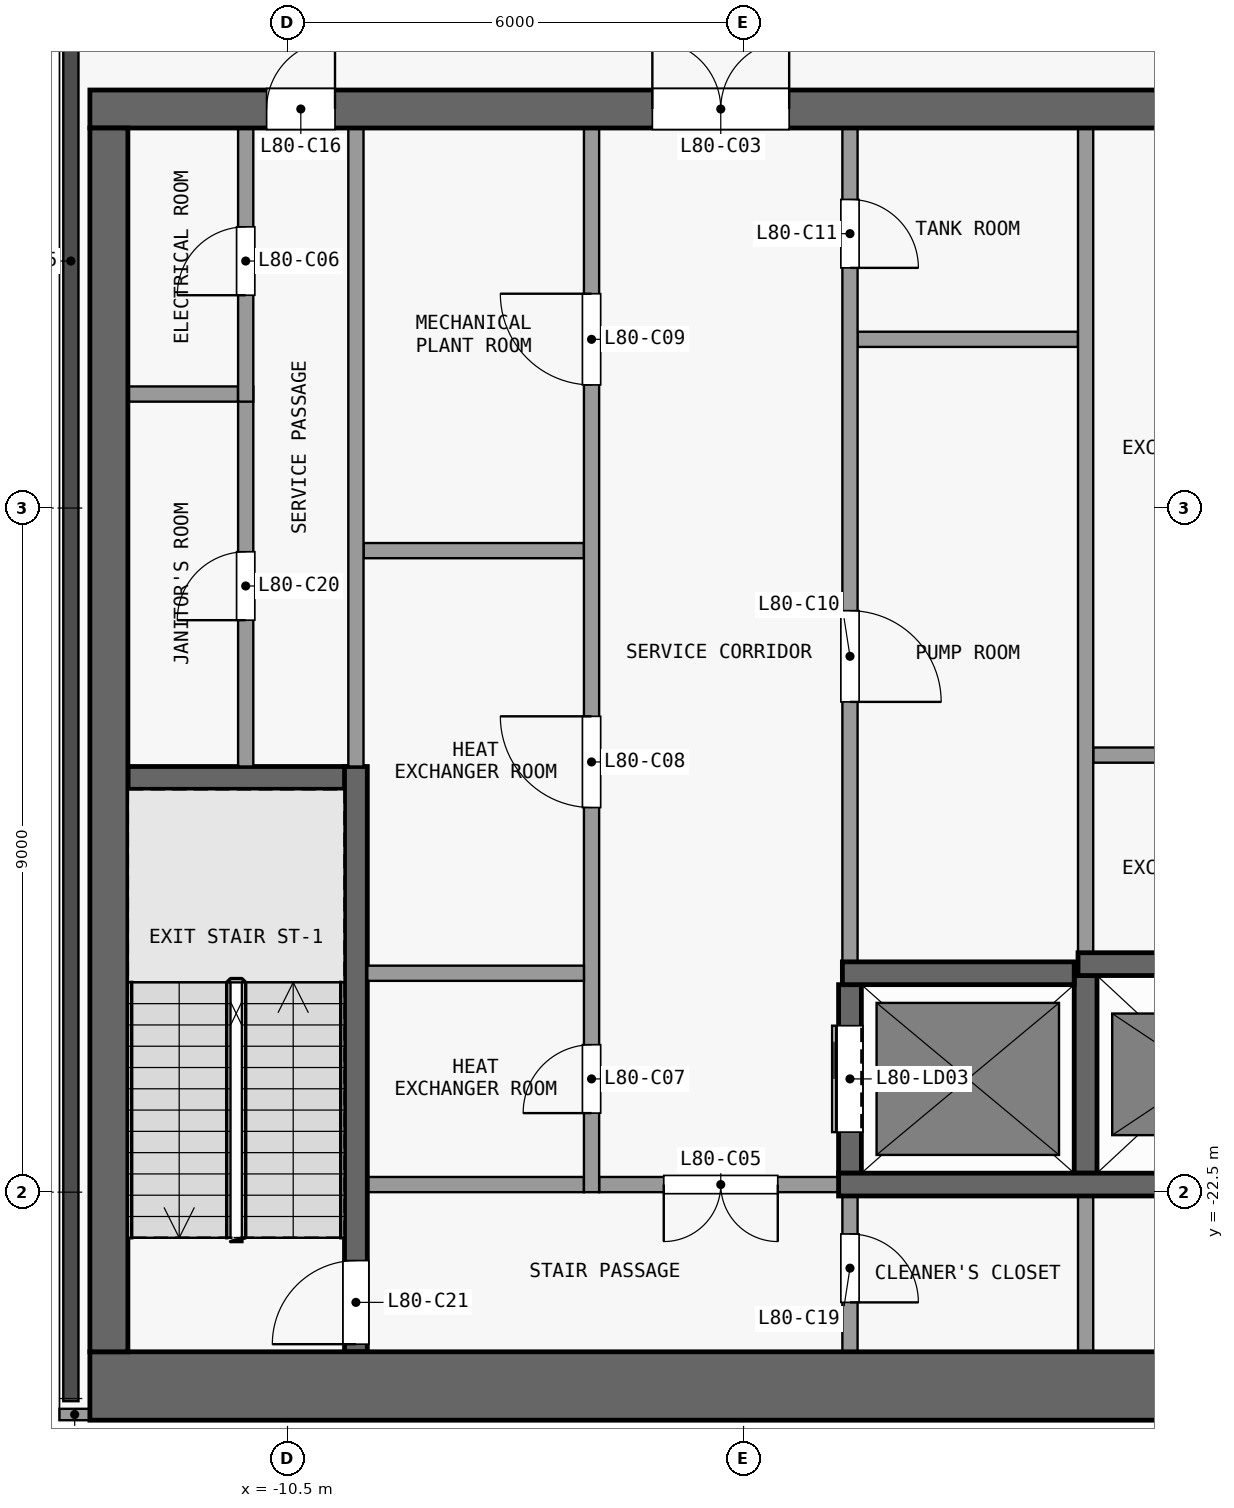
"""IFC4 building model, lengths in metres.
Left out: names, types, materials, properties, quantities, classifications, styles, units other than length and angle.
Written with IfcOpenShell. Run it as: python <this file> out.ifc"""

import sys

from ifc_helpers import new_model, si_unit, direction, frame, frame_2d, origin, place, context, subcontext, project, spatial, rectangle, extrude, element, fill, save


model = new_model("IFC4")
c1 = context("Model", 3, precision=1e-05, world=origin(), true_north=direction((0.0, 1.0)))
c2 = subcontext(c1, "Body", "Model", "MODEL_VIEW")
j1 = project(units=[si_unit("LENGTHUNIT", "METRE"), si_unit("PLANEANGLEUNIT", "RADIAN")], contexts=[c1])
p1 = place(None, origin())
s1 = spatial("IfcSite", under=j1, at=p1, CompositionType="ELEMENT")
p2 = place(p1, origin())
s2 = spatial("IfcBuilding", under=s1, at=p2, CompositionType="ELEMENT")
p3 = place(p2, frame((0.0, 0.0, 316.7)))
s3 = spatial("IfcBuildingStorey", under=s2, at=p3, CompositionType="ELEMENT", Elevation=316.7)
p4 = place(p3, frame((-13.1, -25.05, 0.0), z_axis=(0.0, 0.0, 1.0), x_axis=(1.0, 0.0, 0.0)))
e1 = element("IfcWall", 1, at=p4, inside=s3, PredefinedType="SHEAR", context=c2, shape_type="SweptSolid", body=[
    extrude(rectangle(XDim=26.2, YDim=0.9, at=frame_2d((13.1, 0.0))), origin(), (0.0, 0.0, 1.0), 4.2),
])
p5 = place(p3, frame((-13.1, -8.25, 0.0), z_axis=(0.0, 0.0, 1.0), x_axis=(1.0, 0.0, 0.0)))
e2 = element("IfcWall", 2, at=p5, inside=s3, PredefinedType="SHEAR", context=c2, shape_type="SweptSolid", body=[
    extrude(rectangle(XDim=26.2, YDim=0.5, at=frame_2d((13.1, 0.0))), origin(), (0.0, 0.0, 1.0), 4.2),
])
p6 = place(p5, frame((7.4, 0.0, 0.0)))
e3 = element("IfcOpeningElement", 3, at=p6, cuts=e2, PredefinedType="OPENING", context=c2, shape_type="SweptSolid", body=[
    extrude(rectangle(XDim=1.8, YDim=2.1, at=frame_2d((0.9, 1.05))), frame((0.0, 0.26, 0.0), z_axis=(0.0, -1.0, 0.0), x_axis=(1.0, 0.0, 0.0)), (0.0, 0.0, 1.0), 0.52),
])
p7 = place(p5, frame((17.0, 0.0, 0.0)))
e4 = element("IfcOpeningElement", 4, at=p7, cuts=e2, PredefinedType="OPENING", context=c2, shape_type="SweptSolid", body=[
    extrude(rectangle(XDim=1.8, YDim=2.1, at=frame_2d((0.9, 1.05))), frame((0.0, 0.26, 0.0), z_axis=(0.0, -1.0, 0.0), x_axis=(1.0, 0.0, 0.0)), (0.0, 0.0, 1.0), 0.52),
])
p8 = place(p5, frame((2.325, 0.0, 0.0)))
e5 = element("IfcOpeningElement", 5, at=p8, cuts=e2, PredefinedType="OPENING", context=c2, shape_type="SweptSolid", body=[
    extrude(rectangle(XDim=0.9, YDim=2.1, at=frame_2d((0.45, 1.05))), frame((0.0, 0.26, 0.0), z_axis=(0.0, -1.0, 0.0), x_axis=(1.0, 0.0, 0.0)), (0.0, 0.0, 1.0), 0.52),
])
p9 = place(p5, frame((23.675, 0.0, 0.0)))
e6 = element("IfcOpeningElement", 6, at=p9, cuts=e2, PredefinedType="OPENING", context=c2, shape_type="SweptSolid", body=[
    extrude(rectangle(XDim=1.2, YDim=2.1, at=frame_2d((0.6, 1.05))), frame((0.0, 0.26, 0.0), z_axis=(0.0, -1.0, 0.0), x_axis=(1.0, 0.0, 0.0)), (0.0, 0.0, 1.0), 0.52),
])
p10 = place(p3, frame((-12.85, -24.6, 0.0), z_axis=(0.0, 0.0, 1.0), x_axis=(0.0, 1.0, 0.0)))
e7 = element("IfcWall", 7, at=p10, inside=s3, PredefinedType="SHEAR", context=c2, shape_type="SweptSolid", body=[
    extrude(rectangle(XDim=16.1, YDim=0.5, at=frame_2d((8.05, 0.0))), origin(), (0.0, 0.0, 1.0), 4.2),
])
p11 = place(p3, frame((-9.45, -22.4, 0.0), z_axis=(0.0, 0.0, 1.0), x_axis=(1.0, 0.0, 0.0)))
e8 = element("IfcWall", 8, at=p11, inside=s3, PredefinedType="PARTITIONING", context=c2, shape_type="SweptSolid", body=[
    extrude(rectangle(XDim=2.85, YDim=0.2, at=frame_2d((1.425, 0.0))), origin(), (0.0, 0.0, 1.0), 4.2),
])
p12 = place(p3, frame((-3.25, -22.4, 0.0), z_axis=(0.0, 0.0, 1.0), x_axis=(-1.0, 0.0, 0.0)))
e9 = element("IfcWall", 9, at=p12, inside=s3, PredefinedType="PARTITIONING", context=c2, shape_type="SweptSolid", body=[
    extrude(rectangle(XDim=3.15, YDim=0.2, at=frame_2d((1.575, 0.0))), origin(), (0.0, 0.0, 1.0), 4.2),
])
p13 = place(p12, frame((0.8, 0.0, 0.0)))
e10 = element("IfcOpeningElement", 10, at=p13, cuts=e9, PredefinedType="OPENING", context=c2, shape_type="SweptSolid", body=[
    extrude(rectangle(XDim=1.5, YDim=2.1, at=frame_2d((0.75, 1.05))), frame((0.0, 0.11, 0.0), z_axis=(0.0, -1.0, 0.0), x_axis=(1.0, 0.0, 0.0)), (0.0, 0.0, 1.0), 0.22),
])
p14 = place(p3, frame((-3.25, -22.4, 0.0), z_axis=(0.0, 0.0, 1.0), x_axis=(1.0, 0.0, 0.0)))
e11 = element("IfcWall", 11, at=p14, inside=s3, PredefinedType="SHEAR", context=c2, shape_type="SweptSolid", body=[
    extrude(rectangle(XDim=6.5, YDim=0.3, at=frame_2d((3.25, 0.0))), origin(), (0.0, 0.0, 1.0), 4.2),
])
p15 = place(p3, frame((-9.45, -19.62, 0.0), z_axis=(0.0, 0.0, 1.0), x_axis=(1.0, 0.0, 0.0)))
e12 = element("IfcWall", 12, at=p15, inside=s3, PredefinedType="PARTITIONING", context=c2, shape_type="SweptSolid", body=[
    extrude(rectangle(XDim=2.85, YDim=0.2, at=frame_2d((1.425, 0.0))), origin(), (0.0, 0.0, 1.0), 4.2),
])
p16 = place(p3, frame((-3.2, -19.62, 0.0), z_axis=(0.0, 0.0, 1.0), x_axis=(1.0, 0.0, 0.0)))
e13 = element("IfcWall", 13, at=p16, inside=s3, PredefinedType="SHEAR", context=c2, shape_type="SweptSolid", body=[
    extrude(rectangle(XDim=3.05, YDim=0.3, at=frame_2d((1.525, 0.0))), origin(), (0.0, 0.0, 1.0), 4.2),
])
p17 = place(p3, frame((-0.1, -19.5, 0.0), z_axis=(0.0, 0.0, 1.0), x_axis=(1.0, 0.0, 0.0)))
e14 = element("IfcWall", 14, at=p17, inside=s3, PredefinedType="SHEAR", context=c2, shape_type="SweptSolid", body=[
    extrude(rectangle(XDim=3.3, YDim=0.3, at=frame_2d((1.65, 0.0))), origin(), (0.0, 0.0, 1.0), 4.2),
])
p18 = place(p3, frame((-12.6, -17.05, 0.0), z_axis=(0.0, 0.0, 1.0), x_axis=(1.0, 0.0, 0.0)))
e15 = element("IfcWall", 15, at=p18, inside=s3, PredefinedType="SHEAR", context=c2, shape_type="SweptSolid", body=[
    extrude(rectangle(XDim=3.1, YDim=0.3, at=frame_2d((1.55, 0.0))), origin(), (0.0, 0.0, 1.0), 4.2),
])
for number, where, z_axis, x_axis in (
    (16, (0.1, -16.75, 0.0), (0.0, 0.0, 1.0), (1.0, 0.0, 0.0)),
    (17, (-9.5, -14.06, 0.0), (0.0, 0.0, 1.0), (1.0, 0.0, 0.0)),
):
    element("IfcWall", number, at=place(p3, frame(where, z_axis=z_axis, x_axis=x_axis)), inside=s3, PredefinedType="PARTITIONING", context=c2, shape_type="SweptSolid", body=[
        extrude(rectangle(XDim=2.9, YDim=0.2, at=frame_2d((1.45, 0.0))), origin(), (0.0, 0.0, 1.0), 4.2),
    ])
p19 = place(p3, frame((-12.6, -12.0, 0.0), z_axis=(0.0, 0.0, 1.0), x_axis=(1.0, 0.0, 0.0)))
e18 = element("IfcWall", 18, at=p19, inside=s3, PredefinedType="PARTITIONING", context=c2, shape_type="SweptSolid", body=[
    extrude(rectangle(XDim=1.45, YDim=0.2, at=frame_2d((0.725, 0.0))), origin(), (0.0, 0.0, 1.0), 4.2),
])
p20 = place(p3, frame((-3.0, -11.28, 0.0), z_axis=(0.0, 0.0, 1.0), x_axis=(1.0, 0.0, 0.0)))
e19 = element("IfcWall", 19, at=p20, inside=s3, PredefinedType="PARTITIONING", context=c2, shape_type="SweptSolid", body=[
    extrude(rectangle(XDim=2.9, YDim=0.2, at=frame_2d((1.45, 0.0))), origin(), (0.0, 0.0, 1.0), 4.2),
])
p21 = place(p3, frame((-11.05, -16.9, 0.0), z_axis=(0.0, 0.0, 1.0), x_axis=(0.0, 1.0, 0.0)))
e20 = element("IfcWall", 20, at=p21, inside=s3, PredefinedType="PARTITIONING", context=c2, shape_type="SweptSolid", body=[
    extrude(rectangle(XDim=5.0, YDim=0.2, at=frame_2d((2.5, 0.0))), origin(), (0.0, 0.0, 1.0), 4.2),
])
p22 = place(p21, frame((1.925, 0.0, 0.0)))
e21 = element("IfcOpeningElement", 21, at=p22, cuts=e20, PredefinedType="OPENING", context=c2, shape_type="SweptSolid", body=[
    extrude(rectangle(XDim=0.9, YDim=2.1, at=frame_2d((0.45, 1.05))), frame((0.0, 0.11, 0.0), z_axis=(0.0, -1.0, 0.0), x_axis=(1.0, 0.0, 0.0)), (0.0, 0.0, 1.0), 0.22),
])
p23 = place(p3, frame((-11.05, -12.1, 0.0), z_axis=(0.0, 0.0, 1.0), x_axis=(0.0, 1.0, 0.0)))
e22 = element("IfcWall", 22, at=p23, inside=s3, PredefinedType="PARTITIONING", context=c2, shape_type="SweptSolid", body=[
    extrude(rectangle(XDim=3.6, YDim=0.2, at=frame_2d((1.8, 0.0))), origin(), (0.0, 0.0, 1.0), 4.2),
])
p24 = place(p23, frame((1.4, 0.0, 0.0)))
e23 = element("IfcOpeningElement", 23, at=p24, cuts=e22, PredefinedType="OPENING", context=c2, shape_type="SweptSolid", body=[
    extrude(rectangle(XDim=0.9, YDim=2.1, at=frame_2d((0.45, 1.05))), frame((0.0, 0.11, 0.0), z_axis=(0.0, -1.0, 0.0), x_axis=(1.0, 0.0, 0.0)), (0.0, 0.0, 1.0), 0.22),
])
p25 = place(p3, frame((-9.6, -24.6, 0.0), z_axis=(0.0, 0.0, 1.0), x_axis=(0.0, 1.0, 0.0)))
e24 = element("IfcWall", 24, at=p25, inside=s3, PredefinedType="SHEAR", context=c2, shape_type="SweptSolid", body=[
    extrude(rectangle(XDim=7.7, YDim=0.3, at=frame_2d((3.85, 0.0))), origin(), (0.0, 0.0, 1.0), 4.2),
])
p26 = place(p25, frame((0.1, 0.0, 0.0)))
e25 = element("IfcOpeningElement", 25, at=p26, cuts=e24, PredefinedType="OPENING", context=c2, shape_type="SweptSolid", body=[
    extrude(rectangle(XDim=1.1, YDim=2.1, at=frame_2d((0.55, 1.05))), frame((0.0, 0.16, 0.0), z_axis=(0.0, -1.0, 0.0), x_axis=(1.0, 0.0, 0.0)), (0.0, 0.0, 1.0), 0.32),
])
p27 = place(p3, frame((-9.6, -16.9, 0.0), z_axis=(0.0, 0.0, 1.0), x_axis=(0.0, 1.0, 0.0)))
e26 = element("IfcWall", 26, at=p27, inside=s3, PredefinedType="PARTITIONING", context=c2, shape_type="SweptSolid", body=[
    extrude(rectangle(XDim=8.4, YDim=0.2, at=frame_2d((4.2, 0.0))), origin(), (0.0, 0.0, 1.0), 4.2),
])
p28 = place(p3, frame((-6.5, -22.5, 0.0), z_axis=(0.0, 0.0, 1.0), x_axis=(0.0, 1.0, 0.0)))
e27 = element("IfcWall", 27, at=p28, inside=s3, PredefinedType="PARTITIONING", context=c2, shape_type="SweptSolid", body=[
    extrude(rectangle(XDim=14.0, YDim=0.2, at=frame_2d((7.0, 0.0))), origin(), (0.0, 0.0, 1.0), 4.2),
])
p29 = place(p28, frame((1.04, 0.0, 0.0)))
e28 = element("IfcOpeningElement", 28, at=p29, cuts=e27, PredefinedType="OPENING", context=c2, shape_type="SweptSolid", body=[
    extrude(rectangle(XDim=0.9, YDim=2.1, at=frame_2d((0.45, 1.05))), frame((0.0, 0.11, 0.0), z_axis=(0.0, -1.0, 0.0), x_axis=(1.0, 0.0, 0.0)), (0.0, 0.0, 1.0), 0.22),
])
p30 = place(p28, frame((5.06, 0.0, 0.0)))
e29 = element("IfcOpeningElement", 29, at=p30, cuts=e27, PredefinedType="OPENING", context=c2, shape_type="SweptSolid", body=[
    extrude(rectangle(XDim=1.2, YDim=2.1, at=frame_2d((0.6, 1.05))), frame((0.0, 0.11, 0.0), z_axis=(0.0, -1.0, 0.0), x_axis=(1.0, 0.0, 0.0)), (0.0, 0.0, 1.0), 0.22),
])
p31 = place(p28, frame((10.62, 0.0, 0.0)))
e30 = element("IfcOpeningElement", 30, at=p31, cuts=e27, PredefinedType="OPENING", context=c2, shape_type="SweptSolid", body=[
    extrude(rectangle(XDim=1.2, YDim=2.1, at=frame_2d((0.6, 1.05))), frame((0.0, 0.11, 0.0), z_axis=(0.0, -1.0, 0.0), x_axis=(1.0, 0.0, 0.0)), (0.0, 0.0, 1.0), 0.22),
])
p32 = place(p3, frame((-3.1, -22.55, 0.0), z_axis=(0.0, 0.0, 1.0), x_axis=(0.0, -1.0, 0.0)))
e31 = element("IfcWall", 31, at=p32, inside=s3, PredefinedType="PARTITIONING", context=c2, shape_type="SweptSolid", body=[
    extrude(rectangle(XDim=2.05, YDim=0.2, at=frame_2d((1.025, 0.0))), origin(), (0.0, 0.0, 1.0), 4.2),
])
p33 = place(p32, frame((0.5, 0.0, 0.0)))
e32 = element("IfcOpeningElement", 32, at=p33, cuts=e31, PredefinedType="OPENING", context=c2, shape_type="SweptSolid", body=[
    extrude(rectangle(XDim=0.9, YDim=2.1, at=frame_2d((0.45, 1.05))), frame((0.0, 0.11, 0.0), z_axis=(0.0, -1.0, 0.0), x_axis=(1.0, 0.0, 0.0)), (0.0, 0.0, 1.0), 0.22),
])
p34 = place(p3, frame((-3.1, -22.25, 0.0), z_axis=(0.0, 0.0, 1.0), x_axis=(0.0, 1.0, 0.0)))
e33 = element("IfcWall", 33, at=p34, inside=s3, PredefinedType="SHEAR", context=c2, shape_type="SweptSolid", body=[
    extrude(rectangle(XDim=2.48, YDim=0.3, at=frame_2d((1.24, 0.0))), origin(), (0.0, 0.0, 1.0), 4.2),
])
p35 = place(p34, frame((0.54, 0.0, 0.0)))
e34 = element("IfcOpeningElement", 34, at=p35, cuts=e33, PredefinedType="OPENING", context=c2, shape_type="SweptSolid", body=[
    extrude(rectangle(XDim=1.4, YDim=2.1, at=frame_2d((0.7, 1.05))), frame((0.0, 0.16, 0.0), z_axis=(0.0, -1.0, 0.0), x_axis=(1.0, 0.0, 0.0)), (0.0, 0.0, 1.0), 0.32),
])
p36 = place(p3, frame((-3.1, -8.5, 0.0), z_axis=(0.0, 0.0, 1.0), x_axis=(0.0, -1.0, 0.0)))
e35 = element("IfcWall", 35, at=p36, inside=s3, PredefinedType="PARTITIONING", context=c2, shape_type="SweptSolid", body=[
    extrude(rectangle(XDim=10.97, YDim=0.2, at=frame_2d((5.485, 0.0))), origin(), (0.0, 0.0, 1.0), 4.2),
])
p37 = place(p36, frame((6.35, 0.0, 0.0)))
e36 = element("IfcOpeningElement", 36, at=p37, cuts=e35, PredefinedType="OPENING", context=c2, shape_type="SweptSolid", body=[
    extrude(rectangle(XDim=1.2, YDim=2.1, at=frame_2d((0.6, 1.05))), frame((0.0, 0.11, 0.0), z_axis=(0.0, -1.0, 0.0), x_axis=(1.0, 0.0, 0.0)), (0.0, 0.0, 1.0), 0.22),
])
p38 = place(p36, frame((0.94, 0.0, 0.0)))
e37 = element("IfcOpeningElement", 37, at=p38, cuts=e35, PredefinedType="OPENING", context=c2, shape_type="SweptSolid", body=[
    extrude(rectangle(XDim=0.9, YDim=2.1, at=frame_2d((0.45, 1.05))), frame((0.0, 0.11, 0.0), z_axis=(0.0, -1.0, 0.0), x_axis=(1.0, 0.0, 0.0)), (0.0, 0.0, 1.0), 0.22),
])
p39 = place(p3, frame((0.0, -24.6, 0.0), z_axis=(0.0, 0.0, 1.0), x_axis=(0.0, 1.0, 0.0)))
e38 = element("IfcWall", 38, at=p39, inside=s3, PredefinedType="PARTITIONING", context=c2, shape_type="SweptSolid", body=[
    extrude(rectangle(XDim=2.05, YDim=0.2, at=frame_2d((1.025, 0.0))), origin(), (0.0, 0.0, 1.0), 4.2),
])
p40 = place(p3, frame((0.0, -22.25, 0.0), z_axis=(0.0, 0.0, 1.0), x_axis=(0.0, 1.0, 0.0)))
e39 = element("IfcWall", 39, at=p40, inside=s3, PredefinedType="SHEAR", context=c2, shape_type="SweptSolid", body=[
    extrude(rectangle(XDim=2.6, YDim=0.3, at=frame_2d((1.3, 0.0))), origin(), (0.0, 0.0, 1.0), 4.2),
])
p41 = place(p3, frame((0.0, -19.35, 0.0), z_axis=(0.0, 0.0, 1.0), x_axis=(0.0, 1.0, 0.0)))
e40 = element("IfcWall", 40, at=p41, inside=s3, PredefinedType="PARTITIONING", context=c2, shape_type="SweptSolid", body=[
    extrude(rectangle(XDim=10.85, YDim=0.2, at=frame_2d((5.425, 0.0))), origin(), (0.0, 0.0, 1.0), 4.2),
])
p42 = place(p3, frame((-13.1, -25.425, 0.0), z_axis=(0.0, 0.0, 1.0), x_axis=(-1.0, 0.0, 0.0)))
e41 = element("IfcWall", 41, at=p42, inside=s3, PredefinedType="SOLIDWALL", context=c2, shape_type="SweptSolid", body=[
    extrude(rectangle(XDim=0.4, YDim=0.15, at=frame_2d((0.2, 0.0))), origin(), (0.0, 0.0, 1.0), 4.2),
])
p43 = place(p35, origin())
e42 = element("IfcDoor", 42, at=p43, inside=s3, OperationType="DOUBLE_DOOR_SLIDING", PredefinedType="DOOR", context=c2, shape_type="SweptSolid", body=[
    extrude(rectangle(XDim=1.4, YDim=2.1, at=frame_2d((0.7, 1.05))), frame((0.0, 0.025, 0.0), z_axis=(0.0, -1.0, 0.0), x_axis=(1.0, 0.0, 0.0)), (0.0, 0.0, 1.0), 0.05),
])
fill(e34, e42)
p44 = place(p6, origin())
e43 = element("IfcDoor", 43, at=p44, inside=s3, OperationType="DOUBLE_DOOR_SINGLE_SWING", PredefinedType="DOOR", context=c2, shape_type="SweptSolid", body=[
    extrude(rectangle(XDim=1.8, YDim=2.1, at=frame_2d((0.9, 1.05))), frame((0.0, 0.025, 0.0), z_axis=(0.0, -1.0, 0.0), x_axis=(1.0, 0.0, 0.0)), (0.0, 0.0, 1.0), 0.05),
])
fill(e3, e43)
p45 = place(p13, origin())
e44 = element("IfcDoor", 44, at=p45, inside=s3, OperationType="DOUBLE_DOOR_SINGLE_SWING", PredefinedType="DOOR", context=c2, shape_type="SweptSolid", body=[
    extrude(rectangle(XDim=1.5, YDim=2.1, at=frame_2d((0.75, 1.05))), frame((0.0, 0.025, 0.0), z_axis=(0.0, -1.0, 0.0), x_axis=(1.0, 0.0, 0.0)), (0.0, 0.0, 1.0), 0.05),
])
fill(e10, e44)
p46 = place(p24, origin())
e45 = element("IfcDoor", 45, at=p46, inside=s3, OperationType="SINGLE_SWING_LEFT", PredefinedType="DOOR", context=c2, shape_type="SweptSolid", body=[
    extrude(rectangle(XDim=0.9, YDim=2.1, at=frame_2d((0.45, 1.05))), frame((0.0, 0.025, 0.0), z_axis=(0.0, -1.0, 0.0), x_axis=(1.0, 0.0, 0.0)), (0.0, 0.0, 1.0), 0.05),
])
fill(e23, e45)
p47 = place(p29, origin())
e46 = element("IfcDoor", 46, at=p47, inside=s3, OperationType="SINGLE_SWING_LEFT", PredefinedType="DOOR", context=c2, shape_type="SweptSolid", body=[
    extrude(rectangle(XDim=0.9, YDim=2.1, at=frame_2d((0.45, 1.05))), frame((0.0, 0.025, 0.0), z_axis=(0.0, -1.0, 0.0), x_axis=(1.0, 0.0, 0.0)), (0.0, 0.0, 1.0), 0.05),
])
fill(e28, e46)
p48 = place(p30, origin())
e47 = element("IfcDoor", 47, at=p48, inside=s3, OperationType="SINGLE_SWING_RIGHT", PredefinedType="DOOR", context=c2, shape_type="SweptSolid", body=[
    extrude(rectangle(XDim=1.2, YDim=2.1, at=frame_2d((0.6, 1.05))), frame((0.0, 0.025, 0.0), z_axis=(0.0, -1.0, 0.0), x_axis=(1.0, 0.0, 0.0)), (0.0, 0.0, 1.0), 0.05),
])
fill(e29, e47)
p49 = place(p31, origin())
e48 = element("IfcDoor", 48, at=p49, inside=s3, OperationType="SINGLE_SWING_RIGHT", PredefinedType="DOOR", context=c2, shape_type="SweptSolid", body=[
    extrude(rectangle(XDim=1.2, YDim=2.1, at=frame_2d((0.6, 1.05))), frame((0.0, 0.025, 0.0), z_axis=(0.0, -1.0, 0.0), x_axis=(1.0, 0.0, 0.0)), (0.0, 0.0, 1.0), 0.05),
])
fill(e30, e48)
p50 = place(p37, origin())
e49 = element("IfcDoor", 49, at=p50, inside=s3, OperationType="SINGLE_SWING_RIGHT", PredefinedType="DOOR", context=c2, shape_type="SweptSolid", body=[
    extrude(rectangle(XDim=1.2, YDim=2.1, at=frame_2d((0.6, 1.05))), frame((0.0, 0.025, 0.0), z_axis=(0.0, -1.0, 0.0), x_axis=(1.0, 0.0, 0.0)), (0.0, 0.0, 1.0), 0.05),
])
fill(e36, e49)
p51 = place(p38, origin())
e50 = element("IfcDoor", 50, at=p51, inside=s3, OperationType="SINGLE_SWING_RIGHT", PredefinedType="DOOR", context=c2, shape_type="SweptSolid", body=[
    extrude(rectangle(XDim=0.9, YDim=2.1, at=frame_2d((0.45, 1.05))), frame((0.0, 0.025, 0.0), z_axis=(0.0, -1.0, 0.0), x_axis=(1.0, 0.0, 0.0)), (0.0, 0.0, 1.0), 0.05),
])
fill(e37, e50)
p52 = place(p8, origin())
e51 = element("IfcDoor", 51, at=p52, inside=s3, OperationType="SINGLE_SWING_RIGHT", PredefinedType="DOOR", context=c2, shape_type="SweptSolid", body=[
    extrude(rectangle(XDim=0.9, YDim=2.1, at=frame_2d((0.45, 1.05))), frame((0.0, 0.025, 0.0), z_axis=(0.0, -1.0, 0.0), x_axis=(1.0, 0.0, 0.0)), (0.0, 0.0, 1.0), 0.05),
])
fill(e5, e51)
p53 = place(p33, origin())
e52 = element("IfcDoor", 52, at=p53, inside=s3, OperationType="SINGLE_SWING_RIGHT", PredefinedType="DOOR", context=c2, shape_type="SweptSolid", body=[
    extrude(rectangle(XDim=0.9, YDim=2.1, at=frame_2d((0.45, 1.05))), frame((0.0, 0.025, 0.0), z_axis=(0.0, -1.0, 0.0), x_axis=(1.0, 0.0, 0.0)), (0.0, 0.0, 1.0), 0.05),
])
fill(e32, e52)
p54 = place(p22, origin())
e53 = element("IfcDoor", 53, at=p54, inside=s3, OperationType="SINGLE_SWING_LEFT", PredefinedType="DOOR", context=c2, shape_type="SweptSolid", body=[
    extrude(rectangle(XDim=0.9, YDim=2.1, at=frame_2d((0.45, 1.05))), frame((0.0, 0.025, 0.0), z_axis=(0.0, -1.0, 0.0), x_axis=(1.0, 0.0, 0.0)), (0.0, 0.0, 1.0), 0.05),
])
fill(e21, e53)
p55 = place(p26, origin())
e54 = element("IfcDoor", 54, at=p55, inside=s3, OperationType="SINGLE_SWING_LEFT", PredefinedType="DOOR", context=c2, shape_type="SweptSolid", body=[
    extrude(rectangle(XDim=1.1, YDim=2.1, at=frame_2d((0.55, 1.05))), frame((0.0, 0.025, 0.0), z_axis=(0.0, -1.0, 0.0), x_axis=(1.0, 0.0, 0.0)), (0.0, 0.0, 1.0), 0.05),
])
fill(e25, e54)
save(model, sys.argv[1])
